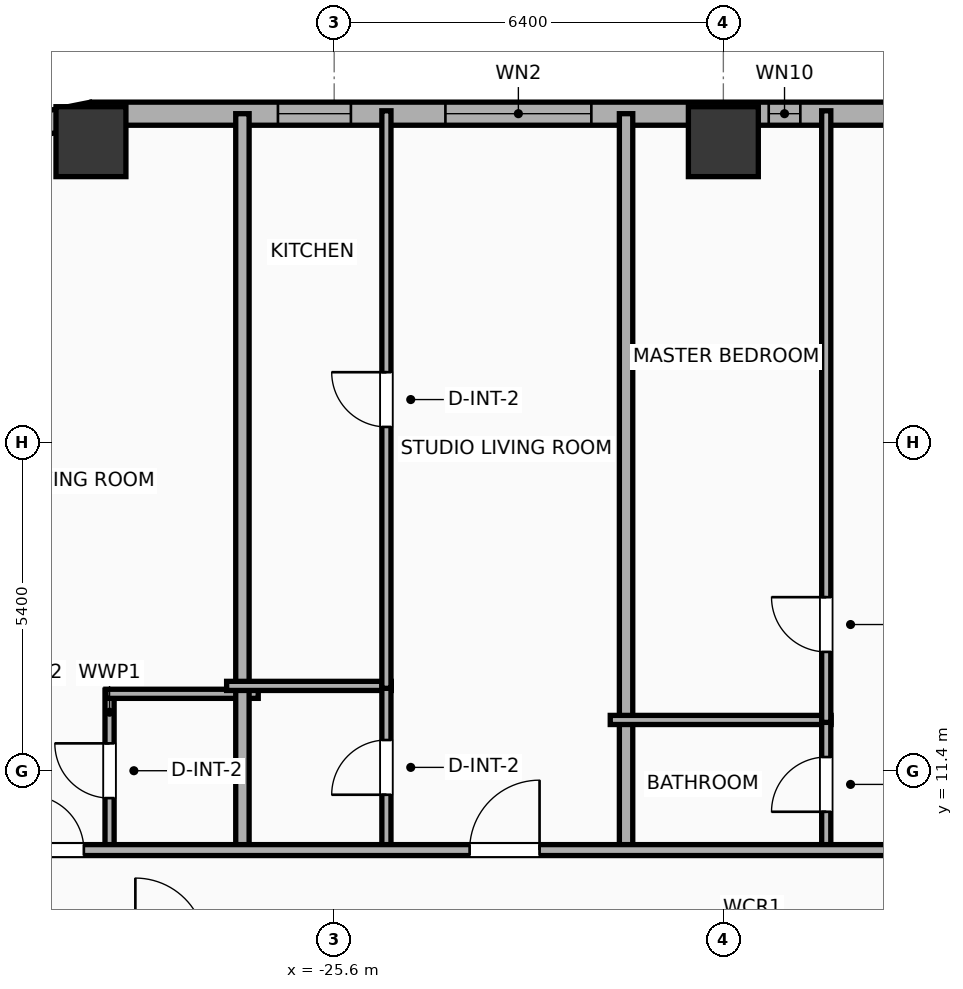
"""IFC4 building model, lengths in metres.
Left out: names, types, materials, properties, quantities, classifications, styles, units other than length and angle.
Written with IfcOpenShell. Run it as: python <this file> out.ifc"""

import sys

from ifc_helpers import new_model, si_unit, direction, frame, frame_2d, origin, origin_2d, place, context, subcontext, project, spatial, rectangle, hollow_rectangle, extrude, element, fill, save


model = new_model("IFC4")
c1 = context("Model", 3, precision=1e-05, world=origin(), true_north=direction((0.0, 1.0)))
c2 = subcontext(c1, "Body", "Model", "MODEL_VIEW")
j1 = project(units=[si_unit("LENGTHUNIT", "METRE"), si_unit("PLANEANGLEUNIT", "RADIAN")], contexts=[c1])
p1 = place(None, origin())
s1 = spatial("IfcSite", under=j1, at=p1, CompositionType="ELEMENT")
p2 = place(p1, origin())
s2 = spatial("IfcBuilding", under=s1, at=p2, CompositionType="ELEMENT")
p3 = place(p2, frame((0.0, 0.0, 68.9)))
s3 = spatial("IfcBuildingStorey", under=s2, at=p3, CompositionType="ELEMENT", Elevation=68.9)
for number, where, z_axis, x_axis in (
    (1, (-19.2, 21.75, 0.0), (0.0, 0.0, 1.0), (1.0, 0.0, 0.0)),
    (2, (-29.6, 21.75, 0.0), (0.0, 0.0, 1.0), (1.0, 0.0, 0.0)),
):
    element("IfcColumn", number, at=place(p3, frame(where, z_axis=z_axis, x_axis=x_axis)), inside=s3, PredefinedType="COLUMN", context=c2, shape_type="SweptSolid", body=[
        extrude(hollow_rectangle(XDim=1.15, YDim=1.15, WallThickness=0.04, at=origin_2d()), origin(), (0.0, 0.0, 1.0), 3.9),
    ])
p4 = place(p3, frame((-31.057, 21.917, 0.0), z_axis=(0.0, 0.0, 1.0), x_axis=(0.980786132421, 0.195086038585, 0.0)))
e3 = element("IfcWall", 3, at=p4, inside=s3, PredefinedType="ELEMENTEDWALL", context=c2, shape_type="SweptSolid", body=[
    extrude(rectangle(XDim=1.504, YDim=0.38, at=frame_2d((0.752, 0.0))), origin(), (0.0, 0.0, 1.0), 3.65),
])
p5 = place(p3, frame((-29.581, 22.21, 0.0), z_axis=(0.0, 0.0, 1.0), x_axis=(1.0, 0.0, 0.0)))
e4 = element("IfcWall", 4, at=p5, inside=s3, PredefinedType="ELEMENTEDWALL", context=c2, shape_type="SweptSolid", body=[
    extrude(rectangle(XDim=51.963, YDim=0.38, at=frame_2d((25.981, 0.0))), origin(), (0.0, 0.0, 1.0), 3.65),
])
p6 = place(p5, frame((5.81, 0.0, 0.75)))
e5 = element("IfcOpeningElement", 5, at=p6, cuts=e4, PredefinedType="OPENING", context=c2, shape_type="SweptSolid", body=[
    extrude(rectangle(XDim=2.4, YDim=2.1, at=frame_2d((1.2, 1.05))), frame((0.0, 0.2, 0.0), z_axis=(0.0, -1.0, 0.0), x_axis=(1.0, 0.0, 0.0)), (0.0, 0.0, 1.0), 0.4),
])
p7 = place(p5, frame((23.931, 0.0, 0.75)))
e6 = element("IfcOpeningElement", 6, at=p7, cuts=e4, PredefinedType="OPENING", context=c2, shape_type="SweptSolid", body=[
    extrude(rectangle(XDim=2.4, YDim=2.1, at=frame_2d((1.2, 1.05))), frame((0.0, 0.2, 0.0), z_axis=(0.0, -1.0, 0.0), x_axis=(1.0, 0.0, 0.0)), (0.0, 0.0, 1.0), 0.4),
])
p8 = place(p5, frame((3.056, 0.0, 0.75)))
e7 = element("IfcOpeningElement", 7, at=p8, cuts=e4, PredefinedType="OPENING", context=c2, shape_type="SweptSolid", body=[
    extrude(rectangle(XDim=1.2, YDim=2.05, at=frame_2d((0.6, 1.025))), frame((0.0, 0.2, 0.0), z_axis=(0.0, -1.0, 0.0), x_axis=(1.0, 0.0, 0.0)), (0.0, 0.0, 1.0), 0.4),
])
p9 = place(p5, frame((11.127, 0.0, 0.75)))
e8 = element("IfcOpeningElement", 8, at=p9, cuts=e4, PredefinedType="OPENING", context=c2, shape_type="SweptSolid", body=[
    extrude(rectangle(XDim=0.52, YDim=2.05, at=frame_2d((0.26, 1.025))), frame((0.0, 0.2, 0.0), z_axis=(0.0, -1.0, 0.0), x_axis=(1.0, 0.0, 0.0)), (0.0, 0.0, 1.0), 0.4),
])
p10 = place(p5, frame((14.327, 0.0, 0.75)))
e9 = element("IfcOpeningElement", 9, at=p10, cuts=e4, PredefinedType="OPENING", context=c2, shape_type="SweptSolid", body=[
    extrude(rectangle(XDim=1.2, YDim=2.05, at=frame_2d((0.6, 1.025))), frame((0.0, 0.2, 0.0), z_axis=(0.0, -1.0, 0.0), x_axis=(1.0, 0.0, 0.0)), (0.0, 0.0, 1.0), 0.4),
])
p11 = place(p5, frame((21.641, 0.0, 0.75)))
e10 = element("IfcOpeningElement", 10, at=p11, cuts=e4, PredefinedType="OPENING", context=c2, shape_type="SweptSolid", body=[
    extrude(rectangle(XDim=1.2, YDim=2.05, at=frame_2d((0.6, 1.025))), frame((0.0, 0.2, 0.0), z_axis=(0.0, -1.0, 0.0), x_axis=(1.0, 0.0, 0.0)), (0.0, 0.0, 1.0), 0.4),
])
p12 = place(p5, frame((18.486, 0.0, 0.75)))
e11 = element("IfcOpeningElement", 11, at=p12, cuts=e4, PredefinedType="OPENING", context=c2, shape_type="SweptSolid", body=[
    extrude(rectangle(XDim=1.2, YDim=2.05, at=frame_2d((0.6, 1.025))), frame((0.0, 0.2, 0.0), z_axis=(0.0, -1.0, 0.0), x_axis=(1.0, 0.0, 0.0)), (0.0, 0.0, 1.0), 0.4),
])
p13 = place(p5, frame((28.976, 0.0, 0.75)))
e12 = element("IfcOpeningElement", 12, at=p13, cuts=e4, PredefinedType="OPENING", context=c2, shape_type="SweptSolid", body=[
    extrude(rectangle(XDim=1.2, YDim=2.05, at=frame_2d((0.6, 1.025))), frame((0.0, 0.2, 0.0), z_axis=(0.0, -1.0, 0.0), x_axis=(1.0, 0.0, 0.0)), (0.0, 0.0, 1.0), 0.4),
])
p14 = place(p5, frame((33.476, 0.0, 0.75)))
e13 = element("IfcOpeningElement", 13, at=p14, cuts=e4, PredefinedType="OPENING", context=c2, shape_type="SweptSolid", body=[
    extrude(rectangle(XDim=1.2, YDim=2.05, at=frame_2d((0.6, 1.025))), frame((0.0, 0.2, 0.0), z_axis=(0.0, -1.0, 0.0), x_axis=(1.0, 0.0, 0.0)), (0.0, 0.0, 1.0), 0.4),
])
p15 = place(p5, frame((36.752, 0.0, 0.75)))
e14 = element("IfcOpeningElement", 14, at=p15, cuts=e4, PredefinedType="OPENING", context=c2, shape_type="SweptSolid", body=[
    extrude(rectangle(XDim=1.2, YDim=2.05, at=frame_2d((0.6, 1.025))), frame((0.0, 0.2, 0.0), z_axis=(0.0, -1.0, 0.0), x_axis=(1.0, 0.0, 0.0)), (0.0, 0.0, 1.0), 0.4),
])
p16 = place(p5, frame((42.452, 0.0, 0.75)))
e15 = element("IfcOpeningElement", 15, at=p16, cuts=e4, PredefinedType="OPENING", context=c2, shape_type="SweptSolid", body=[
    extrude(rectangle(XDim=1.2, YDim=2.05, at=frame_2d((0.6, 1.025))), frame((0.0, 0.2, 0.0), z_axis=(0.0, -1.0, 0.0), x_axis=(1.0, 0.0, 0.0)), (0.0, 0.0, 1.0), 0.4),
])
p17 = place(p5, frame((45.831, 0.0, 0.75)))
e16 = element("IfcOpeningElement", 16, at=p17, cuts=e4, PredefinedType="OPENING", context=c2, shape_type="SweptSolid", body=[
    extrude(rectangle(XDim=1.2, YDim=2.05, at=frame_2d((0.6, 1.025))), frame((0.0, 0.2, 0.0), z_axis=(0.0, -1.0, 0.0), x_axis=(1.0, 0.0, 0.0)), (0.0, 0.0, 1.0), 0.4),
])
p18 = place(p5, frame((48.585, 0.0, 0.75)))
e17 = element("IfcOpeningElement", 17, at=p18, cuts=e4, PredefinedType="OPENING", context=c2, shape_type="SweptSolid", body=[
    extrude(rectangle(XDim=1.2, YDim=2.05, at=frame_2d((0.6, 1.025))), frame((0.0, 0.2, 0.0), z_axis=(0.0, -1.0, 0.0), x_axis=(1.0, 0.0, 0.0)), (0.0, 0.0, 1.0), 0.4),
])
p19 = place(p5, frame((50.421, 0.0, 0.75)))
e18 = element("IfcOpeningElement", 18, at=p19, cuts=e4, PredefinedType="OPENING", context=c2, shape_type="SweptSolid", body=[
    extrude(rectangle(XDim=0.52, YDim=2.05, at=frame_2d((0.26, 1.025))), frame((0.0, 0.2, 0.0), z_axis=(0.0, -1.0, 0.0), x_axis=(1.0, 0.0, 0.0)), (0.0, 0.0, 1.0), 0.4),
])
p20 = place(p3, frame((-29.294, 10.08, 0.0), z_axis=(0.0, 0.0, 1.0), x_axis=(0.0, 1.0, 0.0)))
e19 = element("IfcWall", 19, at=p20, inside=s3, PredefinedType="PLUMBINGWALL", context=c2, shape_type="SweptSolid", body=[
    extrude(rectangle(XDim=2.65, YDim=0.15, at=frame_2d((1.325, 0.0))), origin(), (0.0, 0.0, 1.0), 3.65),
])
p21 = place(p20, frame((0.875, 0.0, 0.0)))
e20 = element("IfcOpeningElement", 20, at=p21, cuts=e19, PredefinedType="OPENING", context=c2, shape_type="SweptSolid", body=[
    extrude(rectangle(XDim=0.9, YDim=2.05, at=frame_2d((0.45, 1.025))), frame((0.0, 0.085, 0.0), z_axis=(0.0, -1.0, 0.0), x_axis=(1.0, 0.0, 0.0)), (0.0, 0.0, 1.0), 0.17),
])
p22 = place(p3, frame((-29.354, 12.67, 0.0), z_axis=(0.0, 0.0, 1.0), x_axis=(1.0, 0.0, 0.0)))
e21 = element("IfcWall", 21, at=p22, inside=s3, PredefinedType="PLUMBINGWALL", context=c2, shape_type="SweptSolid", body=[
    extrude(rectangle(XDim=2.505, YDim=0.15, at=frame_2d((1.252, 0.0))), origin(), (0.0, 0.0, 1.0), 3.65),
])
p23 = place(p3, frame((-27.109, 10.02, 0.0), z_axis=(0.0, 0.0, 1.0), x_axis=(0.0, 1.0, 0.0)))
e22 = element("IfcWall", 22, at=p23, inside=s3, PredefinedType="PARTITIONING", context=c2, shape_type="SweptSolid", body=[
    extrude(rectangle(XDim=12.19, YDim=0.22, at=frame_2d((6.095, 0.0))), origin(), (0.0, 0.0, 1.0), 3.65),
])
p24 = place(p3, frame((-27.369, 12.8, 0.0), z_axis=(0.0, 0.0, 1.0), x_axis=(1.0, 0.0, 0.0)))
e23 = element("IfcWall", 23, at=p24, inside=s3, PredefinedType="PLUMBINGWALL", context=c2, shape_type="SweptSolid", body=[
    extrude(rectangle(XDim=2.708, YDim=0.15, at=frame_2d((1.354, 0.0))), origin(), (0.0, 0.0, 1.0), 3.65),
])
p25 = place(p3, frame((-24.741, 10.08, 0.0), z_axis=(0.0, 0.0, 1.0), x_axis=(0.0, 1.0, 0.0)))
e24 = element("IfcWall", 24, at=p25, inside=s3, PredefinedType="PLUMBINGWALL", context=c2, shape_type="SweptSolid", body=[
    extrude(rectangle(XDim=2.76, YDim=0.15, at=frame_2d((1.38, 0.0))), origin(), (0.0, 0.0, 1.0), 3.65),
])
p26 = place(p25, frame((0.93, 0.0, 0.0)))
e25 = element("IfcOpeningElement", 25, at=p26, cuts=e24, PredefinedType="OPENING", context=c2, shape_type="SweptSolid", body=[
    extrude(rectangle(XDim=0.9, YDim=2.05, at=frame_2d((0.45, 1.025))), frame((0.0, 0.085, 0.0), z_axis=(0.0, -1.0, 0.0), x_axis=(1.0, 0.0, 0.0)), (0.0, 0.0, 1.0), 0.17),
])
p27 = place(p3, frame((-24.741, 12.76, 0.0), z_axis=(0.0, 0.0, 1.0), x_axis=(0.0, 1.0, 0.0)))
e26 = element("IfcWall", 26, at=p27, inside=s3, PredefinedType="PLUMBINGWALL", context=c2, shape_type="SweptSolid", body=[
    extrude(rectangle(XDim=9.498, YDim=0.15, at=frame_2d((4.749, 0.0))), origin(), (0.0, 0.0, 1.0), 3.65),
])
p28 = place(p27, frame((4.299, 0.0, 0.0)))
e27 = element("IfcOpeningElement", 27, at=p28, cuts=e26, PredefinedType="OPENING", context=c2, shape_type="SweptSolid", body=[
    extrude(rectangle(XDim=0.9, YDim=2.05, at=frame_2d((0.45, 1.025))), frame((0.0, 0.085, 0.0), z_axis=(0.0, -1.0, 0.0), x_axis=(1.0, 0.0, 0.0)), (0.0, 0.0, 1.0), 0.17),
])
p29 = place(p3, frame((-20.8, 10.02, 0.0), z_axis=(0.0, 0.0, 1.0), x_axis=(0.0, 1.0, 0.0)))
e28 = element("IfcWall", 28, at=p29, inside=s3, PredefinedType="PARTITIONING", context=c2, shape_type="SweptSolid", body=[
    extrude(rectangle(XDim=12.19, YDim=0.22, at=frame_2d((6.095, 0.0))), origin(), (0.0, 0.0, 1.0), 3.65),
])
p30 = place(p3, frame((-21.06, 12.24, 0.0), z_axis=(0.0, 0.0, 1.0), x_axis=(1.0, 0.0, 0.0)))
e29 = element("IfcWall", 29, at=p30, inside=s3, PredefinedType="PLUMBINGWALL", context=c2, shape_type="SweptSolid", body=[
    extrude(rectangle(XDim=3.632, YDim=0.15, at=frame_2d((1.816, 0.0))), origin(), (0.0, 0.0, 1.0), 3.65),
])
p31 = place(p3, frame((-17.508, 10.08, 0.0), z_axis=(0.0, 0.0, 1.0), x_axis=(0.0, 1.0, 0.0)))
e30 = element("IfcWall", 30, at=p31, inside=s3, PredefinedType="PLUMBINGWALL", context=c2, shape_type="SweptSolid", body=[
    extrude(rectangle(XDim=2.2, YDim=0.15, at=frame_2d((1.1, 0.0))), origin(), (0.0, 0.0, 1.0), 3.65),
])
p32 = place(p31, frame((0.65, 0.0, 0.0)))
e31 = element("IfcOpeningElement", 31, at=p32, cuts=e30, PredefinedType="OPENING", context=c2, shape_type="SweptSolid", body=[
    extrude(rectangle(XDim=0.9, YDim=2.05, at=frame_2d((0.45, 1.025))), frame((0.0, 0.085, 0.0), z_axis=(0.0, -1.0, 0.0), x_axis=(1.0, 0.0, 0.0)), (0.0, 0.0, 1.0), 0.17),
])
p33 = place(p3, frame((-17.508, 12.2, 0.0), z_axis=(0.0, 0.0, 1.0), x_axis=(0.0, 1.0, 0.0)))
e32 = element("IfcWall", 32, at=p33, inside=s3, PredefinedType="PLUMBINGWALL", context=c2, shape_type="SweptSolid", body=[
    extrude(rectangle(XDim=10.058, YDim=0.15, at=frame_2d((5.029, 0.0))), origin(), (0.0, 0.0, 1.0), 3.65),
])
p34 = place(p33, frame((1.159, 0.0, 0.0)))
e33 = element("IfcOpeningElement", 33, at=p34, cuts=e32, PredefinedType="OPENING", context=c2, shape_type="SweptSolid", body=[
    extrude(rectangle(XDim=0.9, YDim=2.05, at=frame_2d((0.45, 1.025))), frame((0.0, 0.085, 0.0), z_axis=(0.0, -1.0, 0.0), x_axis=(1.0, 0.0, 0.0)), (0.0, 0.0, 1.0), 0.17),
])
p35 = place(p3, frame((-33.41, 10.1, 0.0), z_axis=(0.0, 0.0, 1.0), x_axis=(1.0, 0.0, 0.0)))
e34 = element("IfcWall", 34, at=p35, inside=s3, PredefinedType="PARTITIONING", context=c2, shape_type="SweptSolid", body=[
    extrude(rectangle(XDim=59.62, YDim=0.18, at=frame_2d((29.81, 0.0))), origin(), (0.0, 0.0, 1.0), 3.65),
])
p36 = place(p35, frame((2.793, 0.0, 0.0)))
e35 = element("IfcOpeningElement", 35, at=p36, cuts=e34, PredefinedType="OPENING", context=c2, shape_type="SweptSolid", body=[
    extrude(rectangle(XDim=0.9, YDim=2.05, at=frame_2d((0.45, 1.025))), frame((0.0, 0.1, 0.0), z_axis=(0.0, -1.0, 0.0), x_axis=(1.0, 0.0, 0.0)), (0.0, 0.0, 1.0), 0.2),
])
p37 = place(p35, frame((10.037, 0.0, 0.0)))
e36 = element("IfcOpeningElement", 36, at=p37, cuts=e34, PredefinedType="OPENING", context=c2, shape_type="SweptSolid", body=[
    extrude(rectangle(XDim=1.15, YDim=2.05, at=frame_2d((0.575, 1.025))), frame((0.0, 0.1, 0.0), z_axis=(0.0, -1.0, 0.0), x_axis=(1.0, 0.0, 0.0)), (0.0, 0.0, 1.0), 0.2),
])
p38 = place(p35, frame((16.882, 0.0, 0.0)))
e37 = element("IfcOpeningElement", 37, at=p38, cuts=e34, PredefinedType="OPENING", context=c2, shape_type="SweptSolid", body=[
    extrude(rectangle(XDim=1.15, YDim=2.05, at=frame_2d((0.575, 1.025))), frame((0.0, 0.1, 0.0), z_axis=(0.0, -1.0, 0.0), x_axis=(1.0, 0.0, 0.0)), (0.0, 0.0, 1.0), 0.2),
])
p39 = place(p35, frame((25.801, 0.0, 0.0)))
e38 = element("IfcOpeningElement", 38, at=p39, cuts=e34, PredefinedType="OPENING", context=c2, shape_type="SweptSolid", body=[
    extrude(rectangle(XDim=1.15, YDim=2.05, at=frame_2d((0.575, 1.025))), frame((0.0, 0.1, 0.0), z_axis=(0.0, -1.0, 0.0), x_axis=(1.0, 0.0, 0.0)), (0.0, 0.0, 1.0), 0.2),
])
p40 = place(p35, frame((34.72, 0.0, 0.0)))
e39 = element("IfcOpeningElement", 39, at=p40, cuts=e34, PredefinedType="OPENING", context=c2, shape_type="SweptSolid", body=[
    extrude(rectangle(XDim=1.15, YDim=2.05, at=frame_2d((0.575, 1.025))), frame((0.0, 0.1, 0.0), z_axis=(0.0, -1.0, 0.0), x_axis=(1.0, 0.0, 0.0)), (0.0, 0.0, 1.0), 0.2),
])
p41 = place(p35, frame((43.771, 0.0, 0.0)))
e40 = element("IfcOpeningElement", 40, at=p41, cuts=e34, PredefinedType="OPENING", context=c2, shape_type="SweptSolid", body=[
    extrude(rectangle(XDim=1.15, YDim=2.05, at=frame_2d((0.575, 1.025))), frame((0.0, 0.1, 0.0), z_axis=(0.0, -1.0, 0.0), x_axis=(1.0, 0.0, 0.0)), (0.0, 0.0, 1.0), 0.2),
])
p42 = place(p35, frame((49.715, 0.0, 0.0)))
e41 = element("IfcOpeningElement", 41, at=p42, cuts=e34, PredefinedType="OPENING", context=c2, shape_type="SweptSolid", body=[
    extrude(rectangle(XDim=1.15, YDim=2.05, at=frame_2d((0.575, 1.025))), frame((0.0, 0.1, 0.0), z_axis=(0.0, -1.0, 0.0), x_axis=(1.0, 0.0, 0.0)), (0.0, 0.0, 1.0), 0.2),
])
p43 = place(p35, frame((56.654, 0.0, 0.0)))
e42 = element("IfcOpeningElement", 42, at=p43, cuts=e34, PredefinedType="OPENING", context=c2, shape_type="SweptSolid", body=[
    extrude(rectangle(XDim=0.9, YDim=2.05, at=frame_2d((0.45, 1.025))), frame((0.0, 0.1, 0.0), z_axis=(0.0, -1.0, 0.0), x_axis=(1.0, 0.0, 0.0)), (0.0, 0.0, 1.0), 0.2),
])
p44 = place(p6, origin())
e43 = element("IfcWindow", 43, at=p44, inside=s3, PartitioningType="SINGLE_PANEL", PredefinedType="WINDOW", context=c2, shape_type="SweptSolid", body=[
    extrude(rectangle(XDim=2.4, YDim=2.1, at=frame_2d((1.2, 1.05))), frame((0.0, 0.03, 0.0), z_axis=(0.0, -1.0, 0.0), x_axis=(1.0, 0.0, 0.0)), (0.0, 0.0, 1.0), 0.06),
])
fill(e5, e43)
p45 = place(p8, origin())
e44 = element("IfcWindow", 44, at=p45, inside=s3, PartitioningType="SINGLE_PANEL", PredefinedType="WINDOW", context=c2, shape_type="SweptSolid", body=[
    extrude(rectangle(XDim=1.2, YDim=2.05, at=frame_2d((0.6, 1.025))), frame((0.0, 0.03, 0.0), z_axis=(0.0, -1.0, 0.0), x_axis=(1.0, 0.0, 0.0)), (0.0, 0.0, 1.0), 0.06),
])
fill(e7, e44)
p46 = place(p9, origin())
e45 = element("IfcWindow", 45, at=p46, inside=s3, PartitioningType="SINGLE_PANEL", PredefinedType="WINDOW", context=c2, shape_type="SweptSolid", body=[
    extrude(rectangle(XDim=0.52, YDim=2.05, at=frame_2d((0.26, 1.025))), frame((0.0, 0.03, 0.0), z_axis=(0.0, -1.0, 0.0), x_axis=(1.0, 0.0, 0.0)), (0.0, 0.0, 1.0), 0.06),
])
fill(e8, e45)
p47 = place(p21, origin())
e46 = element("IfcDoor", 46, at=p47, inside=s3, OperationType="SINGLE_SWING_RIGHT", PredefinedType="DOOR", context=c2, shape_type="SweptSolid", body=[
    extrude(rectangle(XDim=0.9, YDim=2.05, at=frame_2d((0.45, 1.025))), frame((0.0, 0.025, 0.0), z_axis=(0.0, -1.0, 0.0), x_axis=(1.0, 0.0, 0.0)), (0.0, 0.0, 1.0), 0.05),
])
fill(e20, e46)
p48 = place(p26, origin())
e47 = element("IfcDoor", 47, at=p48, inside=s3, OperationType="SINGLE_SWING_LEFT", PredefinedType="DOOR", context=c2, shape_type="SweptSolid", body=[
    extrude(rectangle(XDim=0.9, YDim=2.05, at=frame_2d((0.45, 1.025))), frame((0.0, 0.025, 0.0), z_axis=(0.0, -1.0, 0.0), x_axis=(1.0, 0.0, 0.0)), (0.0, 0.0, 1.0), 0.05),
])
fill(e25, e47)
p49 = place(p28, origin())
e48 = element("IfcDoor", 48, at=p49, inside=s3, OperationType="SINGLE_SWING_RIGHT", PredefinedType="DOOR", context=c2, shape_type="SweptSolid", body=[
    extrude(rectangle(XDim=0.9, YDim=2.05, at=frame_2d((0.45, 1.025))), frame((0.0, 0.025, 0.0), z_axis=(0.0, -1.0, 0.0), x_axis=(1.0, 0.0, 0.0)), (0.0, 0.0, 1.0), 0.05),
])
fill(e27, e48)
p50 = place(p32, origin())
e49 = element("IfcDoor", 49, at=p50, inside=s3, OperationType="SINGLE_SWING_LEFT", PredefinedType="DOOR", context=c2, shape_type="SweptSolid", body=[
    extrude(rectangle(XDim=0.9, YDim=2.05, at=frame_2d((0.45, 1.025))), frame((0.0, 0.025, 0.0), z_axis=(0.0, -1.0, 0.0), x_axis=(1.0, 0.0, 0.0)), (0.0, 0.0, 1.0), 0.05),
])
fill(e31, e49)
p51 = place(p34, origin())
e50 = element("IfcDoor", 50, at=p51, inside=s3, OperationType="SINGLE_SWING_RIGHT", PredefinedType="DOOR", context=c2, shape_type="SweptSolid", body=[
    extrude(rectangle(XDim=0.9, YDim=2.05, at=frame_2d((0.45, 1.025))), frame((0.0, 0.025, 0.0), z_axis=(0.0, -1.0, 0.0), x_axis=(1.0, 0.0, 0.0)), (0.0, 0.0, 1.0), 0.05),
])
fill(e33, e50)
p52 = place(p36, origin())
e51 = element("IfcDoor", 51, at=p52, inside=s3, OperationType="SINGLE_SWING_LEFT", PredefinedType="DOOR", context=c2, shape_type="SweptSolid", body=[
    extrude(rectangle(XDim=0.9, YDim=2.05, at=frame_2d((0.45, 1.025))), frame((0.0, 0.025, 0.0), z_axis=(0.0, -1.0, 0.0), x_axis=(1.0, 0.0, 0.0)), (0.0, 0.0, 1.0), 0.05),
])
fill(e35, e51)
p53 = place(p37, origin())
e52 = element("IfcDoor", 52, at=p53, inside=s3, OperationType="SINGLE_SWING_RIGHT", PredefinedType="DOOR", context=c2, shape_type="SweptSolid", body=[
    extrude(rectangle(XDim=1.15, YDim=2.05, at=frame_2d((0.575, 1.025))), frame((0.0, 0.025, 0.0), z_axis=(0.0, -1.0, 0.0), x_axis=(1.0, 0.0, 0.0)), (0.0, 0.0, 1.0), 0.05),
])
fill(e36, e52)
save(model, sys.argv[1])
